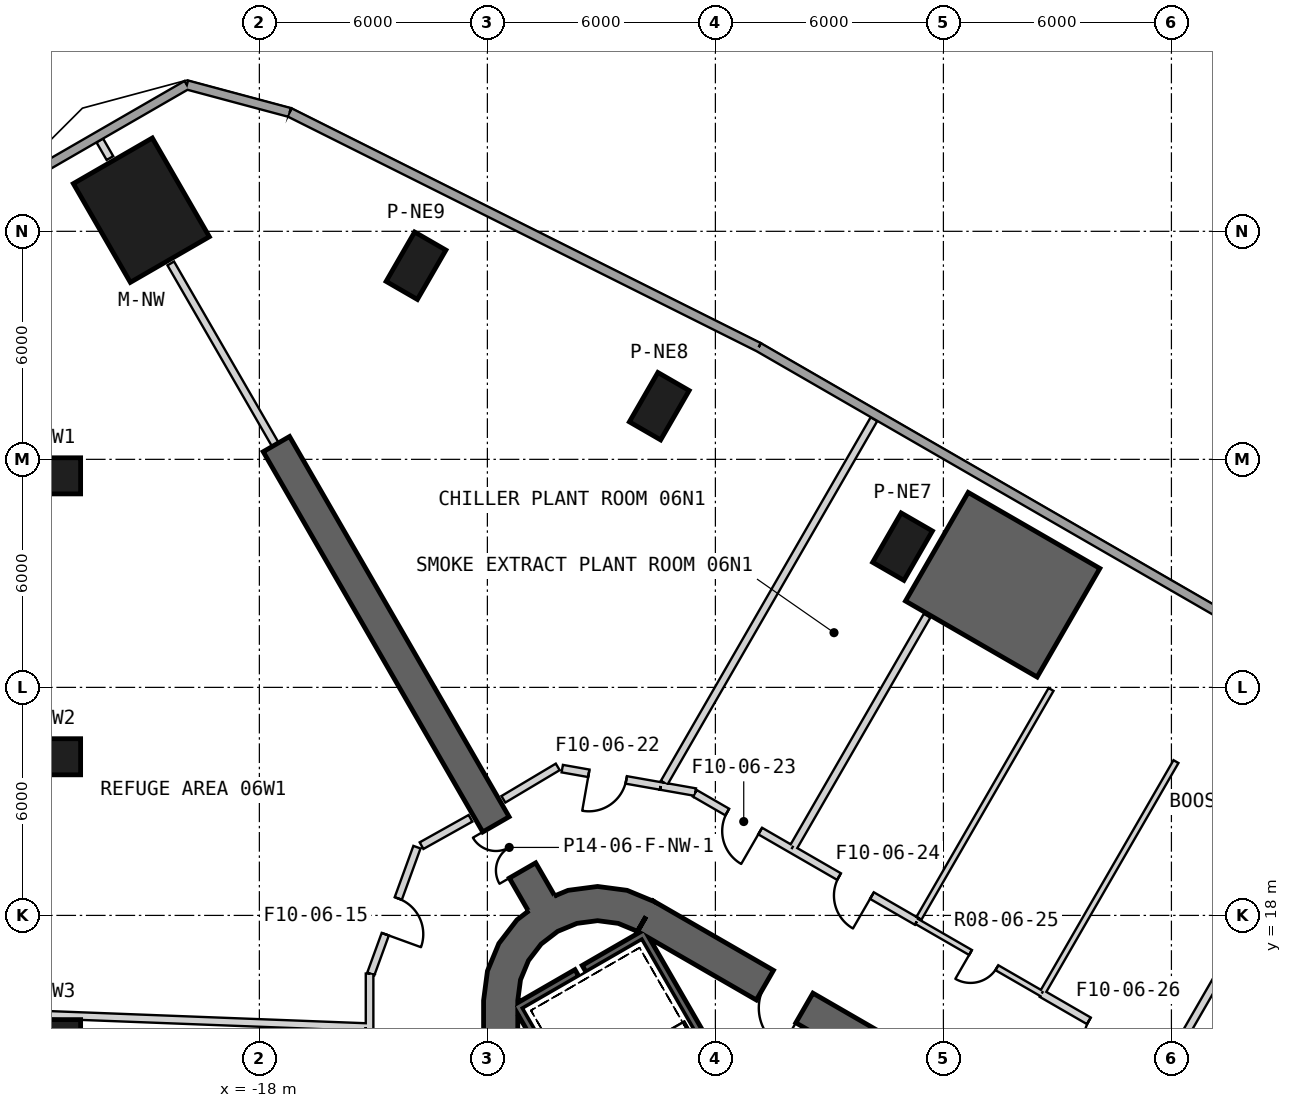
"""IFC4 building model, lengths in metres.
Left out: names, types, materials, properties, quantities, classifications, styles, units other than length and angle.
Written with IfcOpenShell. Run it as: python <this file> out.ifc"""

import sys

from ifc_helpers import new_model, si_unit, direction, frame, frame_2d, origin, origin_2d, place, context, subcontext, project, spatial, polyline, rectangle, outline, extrude, element, fill, save


model = new_model("IFC4")
c1 = context("Model", 3, precision=1e-05, world=origin(), true_north=direction((0.0, 1.0)))
c2 = subcontext(c1, "Body", "Model", "MODEL_VIEW")
j1 = project(units=[si_unit("LENGTHUNIT", "METRE"), si_unit("PLANEANGLEUNIT", "RADIAN")], contexts=[c1])
p1 = place(None, origin())
s1 = spatial("IfcSite", under=j1, at=p1, CompositionType="ELEMENT")
p2 = place(p1, origin())
s2 = spatial("IfcBuilding", under=s1, at=p2, CompositionType="ELEMENT")
p3 = place(p2, frame((0.0, 0.0, 39.5)))
s3 = spatial("IfcBuildingStorey", under=s2, at=p3, CompositionType="ELEMENT", Elevation=39.5)
p4 = place(p3, frame((-21.106, 36.556, 0.0), z_axis=(0.0, 0.0, 1.0), x_axis=(-0.5, 0.866025403784, 0.0)))
e1 = element("IfcColumn", 1, at=p4, inside=s3, PredefinedType="COLUMN", context=c2, shape_type="SweptSolid", body=[
    extrude(rectangle(XDim=3.0, YDim=2.4, at=origin_2d()), origin(), (0.0, 0.0, 1.0), 5.7),
])
for number, where, z_axis, x_axis in (
    (2, (-23.453, 29.566, 0.0), (0.0, 0.0, 1.0), (-1.0, 0.0, 0.0)),
    (3, (-23.453, 22.174, 0.0), (0.0, 0.0, 1.0), (-1.0, 0.0, 0.0)),
    (4, (-23.453, 14.783, 0.0), (0.0, 0.0, 1.0), (-1.0, 0.0, 0.0)),
    (5, (-1.076, 27.703, 0.0), (0.0, 0.0, 1.0), (0.5, 0.866, 0.0)),
    (6, (-7.477, 31.398, 0.0), (0.0, 0.0, 1.0), (0.5, 0.866, 0.0)),
    (7, (-13.878, 35.094, 0.0), (0.0, 0.0, 1.0), (0.5, 0.866, 0.0)),
):
    element("IfcColumn", number, at=place(p3, frame(where, z_axis=z_axis, x_axis=x_axis)), inside=s3, PredefinedType="COLUMN", context=c2, shape_type="SweptSolid", body=[
        extrude(rectangle(XDim=1.5, YDim=0.95, at=origin_2d()), origin(), (0.0, 0.0, 1.0), 5.7),
    ])
p5 = place(p3, frame((19.475, 2.208, 0.0), z_axis=(0.0, 0.0, 1.0), x_axis=(-0.866028369851, 0.499994862586, 0.0)))
e8 = element("IfcWall", 8, at=p5, inside=s3, PredefinedType="SHEAR", context=c2, shape_type="SweptSolid", body=[
    extrude(rectangle(XDim=31.523, YDim=0.9, at=frame_2d((15.762, 0.0))), origin(), (0.0, 0.0, 1.0), 6.0),
])
p6 = place(p5, frame((3.612, 0.0, 0.0)))
e9 = element("IfcOpeningElement", 9, at=p6, cuts=e8, PredefinedType="OPENING", context=c2, shape_type="SweptSolid", body=[
    extrude(rectangle(XDim=1.2, YDim=2.4, at=frame_2d((0.6, 1.2))), frame((0.0, 0.46, 0.0), z_axis=(0.0, -1.0, 0.0), x_axis=(1.0, 0.0, 0.0)), (0.0, 0.0, 1.0), 0.92),
])
p7 = place(p5, frame((26.712, 0.0, 0.0)))
e10 = element("IfcOpeningElement", 10, at=p7, cuts=e8, PredefinedType="OPENING", context=c2, shape_type="SweptSolid", body=[
    extrude(rectangle(XDim=1.2, YDim=2.4, at=frame_2d((0.6, 1.2))), frame((0.0, 0.46, 0.0), z_axis=(0.0, -1.0, 0.0), x_axis=(1.0, 0.0, 0.0)), (0.0, 0.0, 1.0), 0.92),
])
p8 = place(p3, frame((-11.65, 15.762, 0.0), z_axis=(0.0, 0.0, 1.0), x_axis=(0.0, -1.0, 0.0)))
e11 = element("IfcWall", 11, at=p8, inside=s3, PredefinedType="SHEAR", context=c2, shape_type="SweptSolid", body=[
    extrude(rectangle(XDim=31.523, YDim=0.9, at=frame_2d((15.762, 0.0))), origin(), (0.0, 0.0, 1.0), 6.0),
])
p9 = place(p8, frame((3.612, 0.0, 0.0)))
e12 = element("IfcOpeningElement", 12, at=p9, cuts=e11, PredefinedType="OPENING", context=c2, shape_type="SweptSolid", body=[
    extrude(rectangle(XDim=1.2, YDim=2.4, at=frame_2d((0.6, 1.2))), frame((0.0, 0.46, 0.0), z_axis=(0.0, -1.0, 0.0), x_axis=(1.0, 0.0, 0.0)), (0.0, 0.0, 1.0), 0.92),
])
p10 = place(p8, frame((26.712, 0.0, 0.0)))
e13 = element("IfcOpeningElement", 13, at=p10, cuts=e11, PredefinedType="OPENING", context=c2, shape_type="SweptSolid", body=[
    extrude(rectangle(XDim=1.2, YDim=2.4, at=frame_2d((0.6, 1.2))), frame((0.0, 0.46, 0.0), z_axis=(0.0, -1.0, 0.0), x_axis=(1.0, 0.0, 0.0)), (0.0, 0.0, 1.0), 0.92),
])
p11 = place(p3, origin())
e14 = element("IfcWall", 14, at=p11, inside=s3, PredefinedType="SHEAR", context=c2, shape_type="SweptSolid", body=[
    extrude(outline(polyline([(-7.6, 18.36), (-8.323, 18.659), (-9.1, 18.762), (-9.876, 18.659), (-10.6, 18.36), (-11.221, 17.883), (-11.698, 17.262), (-11.998, 16.538), (-12.1, 15.762), (-11.2, 15.762), (-11.128, 16.305), (-10.919, 16.812), (-10.585, 17.247), (-10.15, 17.58), (-9.644, 17.79), (-9.1, 17.862), (-8.556, 17.79), (-8.05, 17.58), (-7.6, 18.36)])), origin(), (0.0, 0.0, 1.0), 6.0),
])
p12 = place(p3, frame((-10.575, 18.316, 0.0), z_axis=(0.0, 0.0, 1.0), x_axis=(-0.499996575515, 0.866027380903, 0.0)))
e15 = element("IfcWall", 15, at=p12, inside=s3, PredefinedType="SHEAR", context=c2, shape_type="SweptSolid", body=[
    extrude(rectangle(XDim=13.954, YDim=0.8, at=frame_2d((6.977, 0.0))), origin(), (0.0, 0.0, 1.0), 6.0),
])
p13 = place(p12, frame((1.0, 0.0, 0.0)))
e16 = element("IfcOpeningElement", 16, at=p13, cuts=e15, PredefinedType="OPENING", context=c2, shape_type="SweptSolid", body=[
    extrude(rectangle(XDim=1.4, YDim=2.4, at=frame_2d((0.7, 1.2))), frame((0.0, 0.41, 0.0), z_axis=(0.0, -1.0, 0.0), x_axis=(1.0, 0.0, 0.0)), (0.0, 0.0, 1.0), 0.82),
])
p14 = place(p3, origin())
e17 = element("IfcWall", 17, at=p14, inside=s3, PredefinedType="SHEAR", context=c2, shape_type="SweptSolid", body=[
    extrude(outline(polyline([(4.116, 27.13), (0.652, 29.13), (-0.998, 26.272), (2.467, 24.272), (4.116, 27.13)])), origin(), (0.0, 0.0, 1.0), 5.7),
])
p15 = place(p3, frame((30.969, 12.269, 0.0), z_axis=(0.0, 0.0, 1.0), x_axis=(-0.866060590604, 0.499939049688, 0.0)))
e18 = element("IfcWall", 18, at=p15, inside=s3, PredefinedType="SOLIDWALL", context=c2, shape_type="SweptSolid", body=[
    extrude(rectangle(XDim=41.371, YDim=0.24, at=frame_2d((20.686, 0.0))), origin(), (0.0, 0.0, 1.0), 5.7),
])
p16 = place(p3, frame((-4.861, 32.952, 0.0), z_axis=(0.0, 0.0, 1.0), x_axis=(-0.894285628533, 0.447496608478, 0.0)))
e19 = element("IfcWall", 19, at=p16, inside=s3, PredefinedType="SOLIDWALL", context=c2, shape_type="SweptSolid", body=[
    extrude(rectangle(XDim=13.801, YDim=0.24, at=frame_2d((6.901, 0.0))), origin(), (0.0, 0.0, 1.0), 5.7),
])
p17 = place(p3, frame((-17.203, 39.128, 0.0), z_axis=(0.0, 0.0, 1.0), x_axis=(-0.965923146675, 0.25882904535, 0.0)))
e20 = element("IfcWall", 20, at=p17, inside=s3, PredefinedType="SOLIDWALL", context=c2, shape_type="SweptSolid", body=[
    extrude(rectangle(XDim=2.801, YDim=0.24, at=frame_2d((1.4, 0.0))), origin(), (0.0, 0.0, 1.0), 5.7),
])
p18 = place(p3, frame((-19.908, 39.853, 0.0), z_axis=(0.0, 0.0, 1.0), x_axis=(-0.866010734295, -0.500025407441, 0.0)))
e21 = element("IfcWall", 21, at=p18, inside=s3, PredefinedType="SOLIDWALL", context=c2, shape_type="SweptSolid", body=[
    extrude(rectangle(XDim=5.371, YDim=0.24, at=frame_2d((2.686, 0.0))), origin(), (0.0, 0.0, 1.0), 5.7),
])
p19 = place(p3, frame((-11.245, 15.678, -0.35), z_axis=(0.0, 0.0, 1.0), x_axis=(0.499977274689, -0.866038523851, 0.0)))
e22 = element("IfcWall", 22, at=p19, inside=s3, PredefinedType="SHEAR", context=c2, shape_type="SweptSolid", body=[
    extrude(rectangle(XDim=8.1, YDim=0.2, at=frame_2d((4.05, 0.0))), origin(), (0.0, 0.0, 1.0), 6.05),
])
p20 = place(p3, frame((-7.818, 17.541, -0.35), z_axis=(0.0, 0.0, 1.0), x_axis=(-0.866088799389, -0.499890179513, 0.0)))
e23 = element("IfcWall", 23, at=p20, inside=s3, PredefinedType="SHEAR", context=c2, shape_type="SweptSolid", body=[
    extrude(rectangle(XDim=1.89, YDim=0.2, at=frame_2d((0.945, 0.0))), origin(), (0.0, 0.0, 1.0), 6.05),
])
p21 = place(p3, frame((-9.645, 16.486, -0.35), z_axis=(0.0, 0.0, 1.0), x_axis=(-0.866038843867, -0.499976720371, 0.0)))
e24 = element("IfcWall", 24, at=p21, inside=s3, PredefinedType="SHEAR", context=c2, shape_type="SweptSolid", body=[
    extrude(rectangle(XDim=1.69, YDim=0.2, at=frame_2d((0.845, 0.0))), origin(), (0.0, 0.0, 1.0), 6.05),
])
p22 = place(p3, frame((-7.854, 17.405, -0.35), z_axis=(0.0, 0.0, 1.0), x_axis=(0.499997992926, -0.866026562566, 0.0)))
e25 = element("IfcWall", 25, at=p22, inside=s3, PredefinedType="SHEAR", context=c2, shape_type="SweptSolid", body=[
    extrude(rectangle(XDim=7.9, YDim=0.2, at=frame_2d((3.95, 0.0))), origin(), (0.0, 0.0, 1.0), 6.05),
])
p23 = place(p3, frame((-15.1, 16.47, 0.0), z_axis=(0.0, 0.0, 1.0), x_axis=(0.0, -1.0, 0.0)))
e26 = element("IfcWall", 26, at=p23, inside=s3, PredefinedType="PARTITIONING", context=c2, shape_type="SweptSolid", body=[
    extrude(rectangle(XDim=32.94, YDim=0.2, at=frame_2d((16.47, 0.0))), origin(), (0.0, 0.0, 1.0), 4.88),
])
p24 = place(p23, frame((3.84, 0.0, 0.0)))
e27 = element("IfcOpeningElement", 27, at=p24, cuts=e26, PredefinedType="OPENING", context=c2, shape_type="SweptSolid", body=[
    extrude(rectangle(XDim=1.0, YDim=2.1, at=frame_2d((0.5, 1.05))), frame((0.0, 0.11, 0.0), z_axis=(0.0, -1.0, 0.0), x_axis=(1.0, 0.0, 0.0)), (0.0, 0.0, 1.0), 0.22),
])
p25 = place(p23, frame((9.805, 0.0, 0.0)))
e28 = element("IfcOpeningElement", 28, at=p25, cuts=e26, PredefinedType="OPENING", context=c2, shape_type="SweptSolid", body=[
    extrude(rectangle(XDim=1.0, YDim=2.1, at=frame_2d((0.5, 1.05))), frame((0.0, 0.11, 0.0), z_axis=(0.0, -1.0, 0.0), x_axis=(1.0, 0.0, 0.0)), (0.0, 0.0, 1.0), 0.22),
])
p26 = place(p23, frame((15.769, 0.0, 0.0)))
e29 = element("IfcOpeningElement", 29, at=p26, cuts=e26, PredefinedType="OPENING", context=c2, shape_type="SweptSolid", body=[
    extrude(rectangle(XDim=1.0, YDim=2.1, at=frame_2d((0.5, 1.05))), frame((0.0, 0.11, 0.0), z_axis=(0.0, -1.0, 0.0), x_axis=(1.0, 0.0, 0.0)), (0.0, 0.0, 1.0), 0.22),
])
p27 = place(p23, frame((21.734, 0.0, 0.0)))
e30 = element("IfcOpeningElement", 30, at=p27, cuts=e26, PredefinedType="OPENING", context=c2, shape_type="SweptSolid", body=[
    extrude(rectangle(XDim=1.0, YDim=2.1, at=frame_2d((0.5, 1.05))), frame((0.0, 0.11, 0.0), z_axis=(0.0, -1.0, 0.0), x_axis=(1.0, 0.0, 0.0)), (0.0, 0.0, 1.0), 0.22),
])
p28 = place(p23, frame((27.699, 0.0, 0.0)))
e31 = element("IfcOpeningElement", 31, at=p28, cuts=e26, PredefinedType="OPENING", context=c2, shape_type="SweptSolid", body=[
    extrude(rectangle(XDim=1.0, YDim=2.1, at=frame_2d((0.5, 1.05))), frame((0.0, 0.11, 0.0), z_axis=(0.0, -1.0, 0.0), x_axis=(1.0, 0.0, 0.0)), (0.0, 0.0, 1.0), 0.22),
])
p29 = place(p3, frame((-13.853, 19.796, 0.0), z_axis=(0.0, 0.0, 1.0), x_axis=(-0.342013954414, -0.939694873342, 0.0)))
e32 = element("IfcWall", 32, at=p29, inside=s3, PredefinedType="PARTITIONING", context=c2, shape_type="SweptSolid", body=[
    extrude(rectangle(XDim=3.546, YDim=0.2, at=frame_2d((1.773, 0.0))), origin(), (0.0, 0.0, 1.0), 4.78),
])
p30 = place(p29, frame((1.437, 0.0, 0.0)))
e33 = element("IfcOpeningElement", 33, at=p30, cuts=e32, PredefinedType="OPENING", context=c2, shape_type="SweptSolid", body=[
    extrude(rectangle(XDim=1.0, YDim=2.1, at=frame_2d((0.5, 1.05))), frame((0.0, 0.11, 0.0), z_axis=(0.0, -1.0, 0.0), x_axis=(1.0, 0.0, 0.0)), (0.0, 0.0, 1.0), 0.22),
])
p31 = place(p3, frame((-12.445, 20.555, 0.0), z_axis=(0.0, 0.0, 1.0), x_axis=(-0.873030545865, -0.487665526757, 0.0)))
e34 = element("IfcWall", 34, at=p31, inside=s3, PredefinedType="PARTITIONING", context=c2, shape_type="SweptSolid", body=[
    extrude(rectangle(XDim=1.475, YDim=0.2, at=frame_2d((0.737, 0.0))), origin(), (0.0, 0.0, 1.0), 5.7),
])
p32 = place(p3, frame((-25.984, 15.477, 0.0), z_axis=(0.0, 0.0, 1.0), x_axis=(0.999262877785, -0.038388814516, 0.0)))
e35 = element("IfcWall", 35, at=p32, inside=s3, PredefinedType="PARTITIONING", context=c2, shape_type="SweptSolid", body=[
    extrude(rectangle(XDim=10.792, YDim=0.2, at=frame_2d((5.396, 0.0))), origin(), (0.0, 0.0, 1.0), 4.88),
])
p33 = place(p3, frame((-17.578, 30.386, 0.0), z_axis=(0.0, 0.0, 1.0), x_axis=(-0.499982128061, 0.866035721907, 0.0)))
e36 = element("IfcWall", 36, at=p33, inside=s3, PredefinedType="PARTITIONING", context=c2, shape_type="SweptSolid", body=[
    extrude(rectangle(XDim=5.507, YDim=0.2, at=frame_2d((2.753, 0.0))), origin(), (0.0, 0.0, 1.0), 5.27),
])
p34 = place(p3, frame((-21.932, 37.927, 0.0), z_axis=(0.0, 0.0, 1.0), x_axis=(-0.499761856089, 0.866162852585, 0.0)))
e37 = element("IfcWall", 37, at=p34, inside=s3, PredefinedType="PARTITIONING", context=c2, shape_type="SweptSolid", body=[
    extrude(rectangle(XDim=0.536, YDim=0.2, at=frame_2d((0.268, 0.0))), origin(), (0.0, 0.0, 1.0), 5.7),
])
p35 = place(p3, frame((-10.148, 21.908, 0.0), z_axis=(0.0, 0.0, 1.0), x_axis=(-0.858835346978, -0.512251741608, 0.0)))
e38 = element("IfcWall", 38, at=p35, inside=s3, PredefinedType="PARTITIONING", context=c2, shape_type="SweptSolid", body=[
    extrude(rectangle(XDim=1.665, YDim=0.2, at=frame_2d((0.833, 0.0))), origin(), (0.0, 0.0, 1.0), 5.7),
])
p36 = place(p3, frame((-6.528, 21.245, 0.0), z_axis=(0.0, 0.0, 1.0), x_axis=(-0.984820658636, 0.173574970324, 0.0)))
e39 = element("IfcWall", 39, at=p36, inside=s3, PredefinedType="PARTITIONING", context=c2, shape_type="SweptSolid", body=[
    extrude(rectangle(XDim=0.927, YDim=0.2, at=frame_2d((0.463, 0.0))), origin(), (0.0, 0.0, 1.0), 5.7),
])
p37 = place(p3, frame((-7.441, 21.406, 0.0), z_axis=(0.0, 0.0, 1.0), x_axis=(-0.984798516993, 0.173700549592, 0.0)))
e40 = element("IfcWall", 40, at=p37, inside=s3, PredefinedType="PARTITIONING", context=c2, shape_type="SweptSolid", body=[
    extrude(rectangle(XDim=2.628, YDim=0.2, at=frame_2d((1.314, 0.0))), origin(), (0.0, 0.0, 1.0), 4.78),
])
p38 = place(p37, frame((0.919, 0.0, 0.0)))
e41 = element("IfcOpeningElement", 41, at=p38, cuts=e40, PredefinedType="OPENING", context=c2, shape_type="SweptSolid", body=[
    extrude(rectangle(XDim=1.0, YDim=2.1, at=frame_2d((0.5, 1.05))), frame((0.0, 0.11, 0.0), z_axis=(0.0, -1.0, 0.0), x_axis=(1.0, 0.0, 0.0)), (0.0, 0.0, 1.0), 0.22),
])
p39 = place(p3, frame((9.15, 12.153, 0.0), z_axis=(0.0, 0.0, 1.0), x_axis=(-0.866026268399, 0.49999850244, 0.0)))
e42 = element("IfcWall", 42, at=p39, inside=s3, PredefinedType="PARTITIONING", context=c2, shape_type="SweptSolid", body=[
    extrude(rectangle(XDim=7.579, YDim=0.2, at=frame_2d((3.79, 0.0))), origin(), (0.0, 0.0, 1.0), 4.98),
])
p40 = place(p39, frame((5.146, 0.0, 0.0)))
e43 = element("IfcOpeningElement", 43, at=p40, cuts=e42, PredefinedType="OPENING", context=c2, shape_type="SweptSolid", body=[
    extrude(rectangle(XDim=1.0, YDim=2.1, at=frame_2d((0.5, 1.05))), frame((0.0, 0.11, 0.0), z_axis=(0.0, -1.0, 0.0), x_axis=(1.0, 0.0, 0.0)), (0.0, 0.0, 1.0), 0.22),
])
p41 = place(p39, frame((1.35, 0.0, 0.0)))
e44 = element("IfcOpeningElement", 44, at=p41, cuts=e42, PredefinedType="OPENING", context=c2, shape_type="SweptSolid", body=[
    extrude(rectangle(XDim=1.0, YDim=2.1, at=frame_2d((0.5, 1.05))), frame((0.0, 0.11, 0.0), z_axis=(0.0, -1.0, 0.0), x_axis=(1.0, 0.0, 0.0)), (0.0, 0.0, 1.0), 0.22),
])
p42 = place(p3, frame((-0.7, 17.84, 0.0), z_axis=(0.0, 0.0, 1.0), x_axis=(-0.866009436129, 0.500027655771, 0.0)))
e45 = element("IfcWall", 45, at=p42, inside=s3, PredefinedType="PARTITIONING", context=c2, shape_type="SweptSolid", body=[
    extrude(rectangle(XDim=3.808, YDim=0.2, at=frame_2d((1.904, 0.0))), origin(), (0.0, 0.0, 1.0), 4.88),
])
p43 = place(p42, frame((1.363, 0.0, 0.0)))
e46 = element("IfcOpeningElement", 46, at=p43, cuts=e45, PredefinedType="OPENING", context=c2, shape_type="SweptSolid", body=[
    extrude(rectangle(XDim=1.0, YDim=2.1, at=frame_2d((0.5, 1.05))), frame((0.0, 0.11, 0.0), z_axis=(0.0, -1.0, 0.0), x_axis=(1.0, 0.0, 0.0)), (0.0, 0.0, 1.0), 0.22),
])
p44 = place(p3, frame((-3.999, 19.745, 0.0), z_axis=(0.0, 0.0, 1.0), x_axis=(-0.866053990355, 0.499950483338, 0.0)))
e47 = element("IfcWall", 47, at=p44, inside=s3, PredefinedType="PARTITIONING", context=c2, shape_type="SweptSolid", body=[
    extrude(rectangle(XDim=2.935, YDim=0.2, at=frame_2d((1.467, 0.0))), origin(), (0.0, 0.0, 1.0), 4.88),
])
p45 = place(p44, frame((0.95, 0.0, 0.0)))
e48 = element("IfcOpeningElement", 48, at=p45, cuts=e47, PredefinedType="OPENING", context=c2, shape_type="SweptSolid", body=[
    extrude(rectangle(XDim=1.0, YDim=2.1, at=frame_2d((0.5, 1.05))), frame((0.0, 0.11, 0.0), z_axis=(0.0, -1.0, 0.0), x_axis=(1.0, 0.0, 0.0)), (0.0, 0.0, 1.0), 0.22),
])
p46 = place(p3, frame((2.587, 15.943, 0.0), z_axis=(0.0, 0.0, 1.0), x_axis=(-0.866037770685, 0.499978579288, 0.0)))
e49 = element("IfcWall", 49, at=p46, inside=s3, PredefinedType="PLUMBINGWALL", context=c2, shape_type="SweptSolid", body=[
    extrude(rectangle(XDim=3.796, YDim=0.15, at=frame_2d((1.898, 0.0))), origin(), (0.0, 0.0, 1.0), 4.88),
])
p47 = place(p46, frame((1.363, 0.0, 0.0)))
e50 = element("IfcOpeningElement", 50, at=p47, cuts=e49, PredefinedType="OPENING", context=c2, shape_type="SweptSolid", body=[
    extrude(rectangle(XDim=0.8, YDim=2.1, at=frame_2d((0.4, 1.05))), frame((0.0, 0.085, 0.0), z_axis=(0.0, -1.0, 0.0), x_axis=(1.0, 0.0, 0.0)), (0.0, 0.0, 1.0), 0.17),
])
p48 = place(p3, frame((-7.348, 21.491, 0.0), z_axis=(0.0, 0.0, 1.0), x_axis=(0.499855125304, 0.866109031074, 0.0)))
e51 = element("IfcWall", 51, at=p48, inside=s3, PredefinedType="PARTITIONING", context=c2, shape_type="SweptSolid", body=[
    extrude(rectangle(XDim=11.045, YDim=0.2, at=frame_2d((5.522, 0.0))), origin(), (0.0, 0.0, 1.0), 4.88),
])
p49 = place(p3, frame((-3.931, 19.821, 0.0), z_axis=(0.0, 0.0, 1.0), x_axis=(0.499997052475, 0.866027105532, 0.0)))
e52 = element("IfcWall", 52, at=p49, inside=s3, PredefinedType="PARTITIONING", context=c2, shape_type="SweptSolid", body=[
    extrude(rectangle(XDim=7.003, YDim=0.2, at=frame_2d((3.502, 0.0))), origin(), (0.0, 0.0, 1.0), 4.88),
])
p50 = place(p3, frame((-0.644, 17.923, 0.0), z_axis=(0.0, 0.0, 1.0), x_axis=(0.500017264306, 0.866015436003, 0.0)))
e53 = element("IfcWall", 53, at=p50, inside=s3, PredefinedType="PLUMBINGWALL", context=c2, shape_type="SweptSolid", body=[
    extrude(rectangle(XDim=6.953, YDim=0.15, at=frame_2d((3.477, 0.0))), origin(), (0.0, 0.0, 1.0), 4.88),
])
p51 = place(p3, frame((2.631, 16.004, 0.0), z_axis=(0.0, 0.0, 1.0), x_axis=(0.500007122158, 0.866021291765, 0.0)))
e54 = element("IfcWall", 54, at=p51, inside=s3, PredefinedType="PLUMBINGWALL", context=c2, shape_type="SweptSolid", body=[
    extrude(rectangle(XDim=6.979, YDim=0.15, at=frame_2d((3.489, 0.0))), origin(), (0.0, 0.0, 1.0), 4.98),
])
p52 = place(p3, frame((9.407, 20.149, 0.0), z_axis=(0.0, 0.0, 1.0), x_axis=(-0.500002060787, -0.866024213985, 0.0)))
e55 = element("IfcWall", 55, at=p52, inside=s3, PredefinedType="PARTITIONING", context=c2, shape_type="SweptSolid", body=[
    extrude(rectangle(XDim=6.954, YDim=0.2, at=frame_2d((3.477, 0.0))), origin(), (0.0, 0.0, 1.0), 5.7),
])
p53 = place(p30, origin())
e56 = element("IfcDoor", 56, at=p53, inside=s3, OperationType="SINGLE_SWING_RIGHT", PredefinedType="USERDEFINED", context=c2, shape_type="SweptSolid", body=[
    extrude(rectangle(XDim=1.0, YDim=2.1, at=frame_2d((0.5, 1.05))), frame((0.0, 0.025, 0.0), z_axis=(0.0, -1.0, 0.0), x_axis=(1.0, 0.0, 0.0)), (0.0, 0.0, 1.0), 0.05),
])
fill(e33, e56)
p54 = place(p38, origin())
e57 = element("IfcDoor", 57, at=p54, inside=s3, OperationType="SINGLE_SWING_RIGHT", PredefinedType="USERDEFINED", context=c2, shape_type="SweptSolid", body=[
    extrude(rectangle(XDim=1.0, YDim=2.1, at=frame_2d((0.5, 1.05))), frame((0.0, 0.025, 0.0), z_axis=(0.0, -1.0, 0.0), x_axis=(1.0, 0.0, 0.0)), (0.0, 0.0, 1.0), 0.05),
])
fill(e41, e57)
p55 = place(p45, origin())
e58 = element("IfcDoor", 58, at=p55, inside=s3, OperationType="SINGLE_SWING_LEFT", PredefinedType="USERDEFINED", context=c2, shape_type="SweptSolid", body=[
    extrude(rectangle(XDim=1.0, YDim=2.1, at=frame_2d((0.5, 1.05))), frame((0.0, 0.025, 0.0), z_axis=(0.0, -1.0, 0.0), x_axis=(1.0, 0.0, 0.0)), (0.0, 0.0, 1.0), 0.05),
])
fill(e48, e58)
p56 = place(p43, origin())
e59 = element("IfcDoor", 59, at=p56, inside=s3, OperationType="SINGLE_SWING_LEFT", PredefinedType="USERDEFINED", context=c2, shape_type="SweptSolid", body=[
    extrude(rectangle(XDim=1.0, YDim=2.1, at=frame_2d((0.5, 1.05))), frame((0.0, 0.025, 0.0), z_axis=(0.0, -1.0, 0.0), x_axis=(1.0, 0.0, 0.0)), (0.0, 0.0, 1.0), 0.05),
])
fill(e46, e59)
p57 = place(p47, origin())
e60 = element("IfcDoor", 60, at=p57, inside=s3, OperationType="SINGLE_SWING_RIGHT", PredefinedType="USERDEFINED", context=c2, shape_type="SweptSolid", body=[
    extrude(rectangle(XDim=0.8, YDim=2.1, at=frame_2d((0.4, 1.05))), frame((0.0, 0.025, 0.0), z_axis=(0.0, -1.0, 0.0), x_axis=(1.0, 0.0, 0.0)), (0.0, 0.0, 1.0), 0.05),
])
fill(e50, e60)
p58 = place(p40, origin())
e61 = element("IfcDoor", 61, at=p58, inside=s3, OperationType="SINGLE_SWING_LEFT", PredefinedType="USERDEFINED", context=c2, shape_type="SweptSolid", body=[
    extrude(rectangle(XDim=1.0, YDim=2.1, at=frame_2d((0.5, 1.05))), frame((0.0, 0.025, 0.0), z_axis=(0.0, -1.0, 0.0), x_axis=(1.0, 0.0, 0.0)), (0.0, 0.0, 1.0), 0.05),
])
fill(e43, e61)
p59 = place(p7, origin())
e62 = element("IfcDoor", 62, at=p59, inside=s3, OperationType="SINGLE_SWING_LEFT", PredefinedType="USERDEFINED", context=c2, shape_type="SweptSolid", body=[
    extrude(rectangle(XDim=1.2, YDim=2.4, at=frame_2d((0.6, 1.2))), frame((0.0, 0.025, 0.0), z_axis=(0.0, -1.0, 0.0), x_axis=(1.0, 0.0, 0.0)), (0.0, 0.0, 1.0), 0.05),
])
fill(e10, e62)
p60 = place(p13, origin())
e63 = element("IfcDoor", 63, at=p60, inside=s3, OperationType="DOUBLE_DOOR_SINGLE_SWING", PredefinedType="NOTDEFINED", context=c2, shape_type="SweptSolid", body=[
    extrude(rectangle(XDim=1.4, YDim=2.4, at=frame_2d((0.7, 1.2))), frame((0.0, 0.025, 0.0), z_axis=(0.0, -1.0, 0.0), x_axis=(1.0, 0.0, 0.0)), (0.0, 0.0, 1.0), 0.05),
])
fill(e16, e63)
save(model, sys.argv[1])
